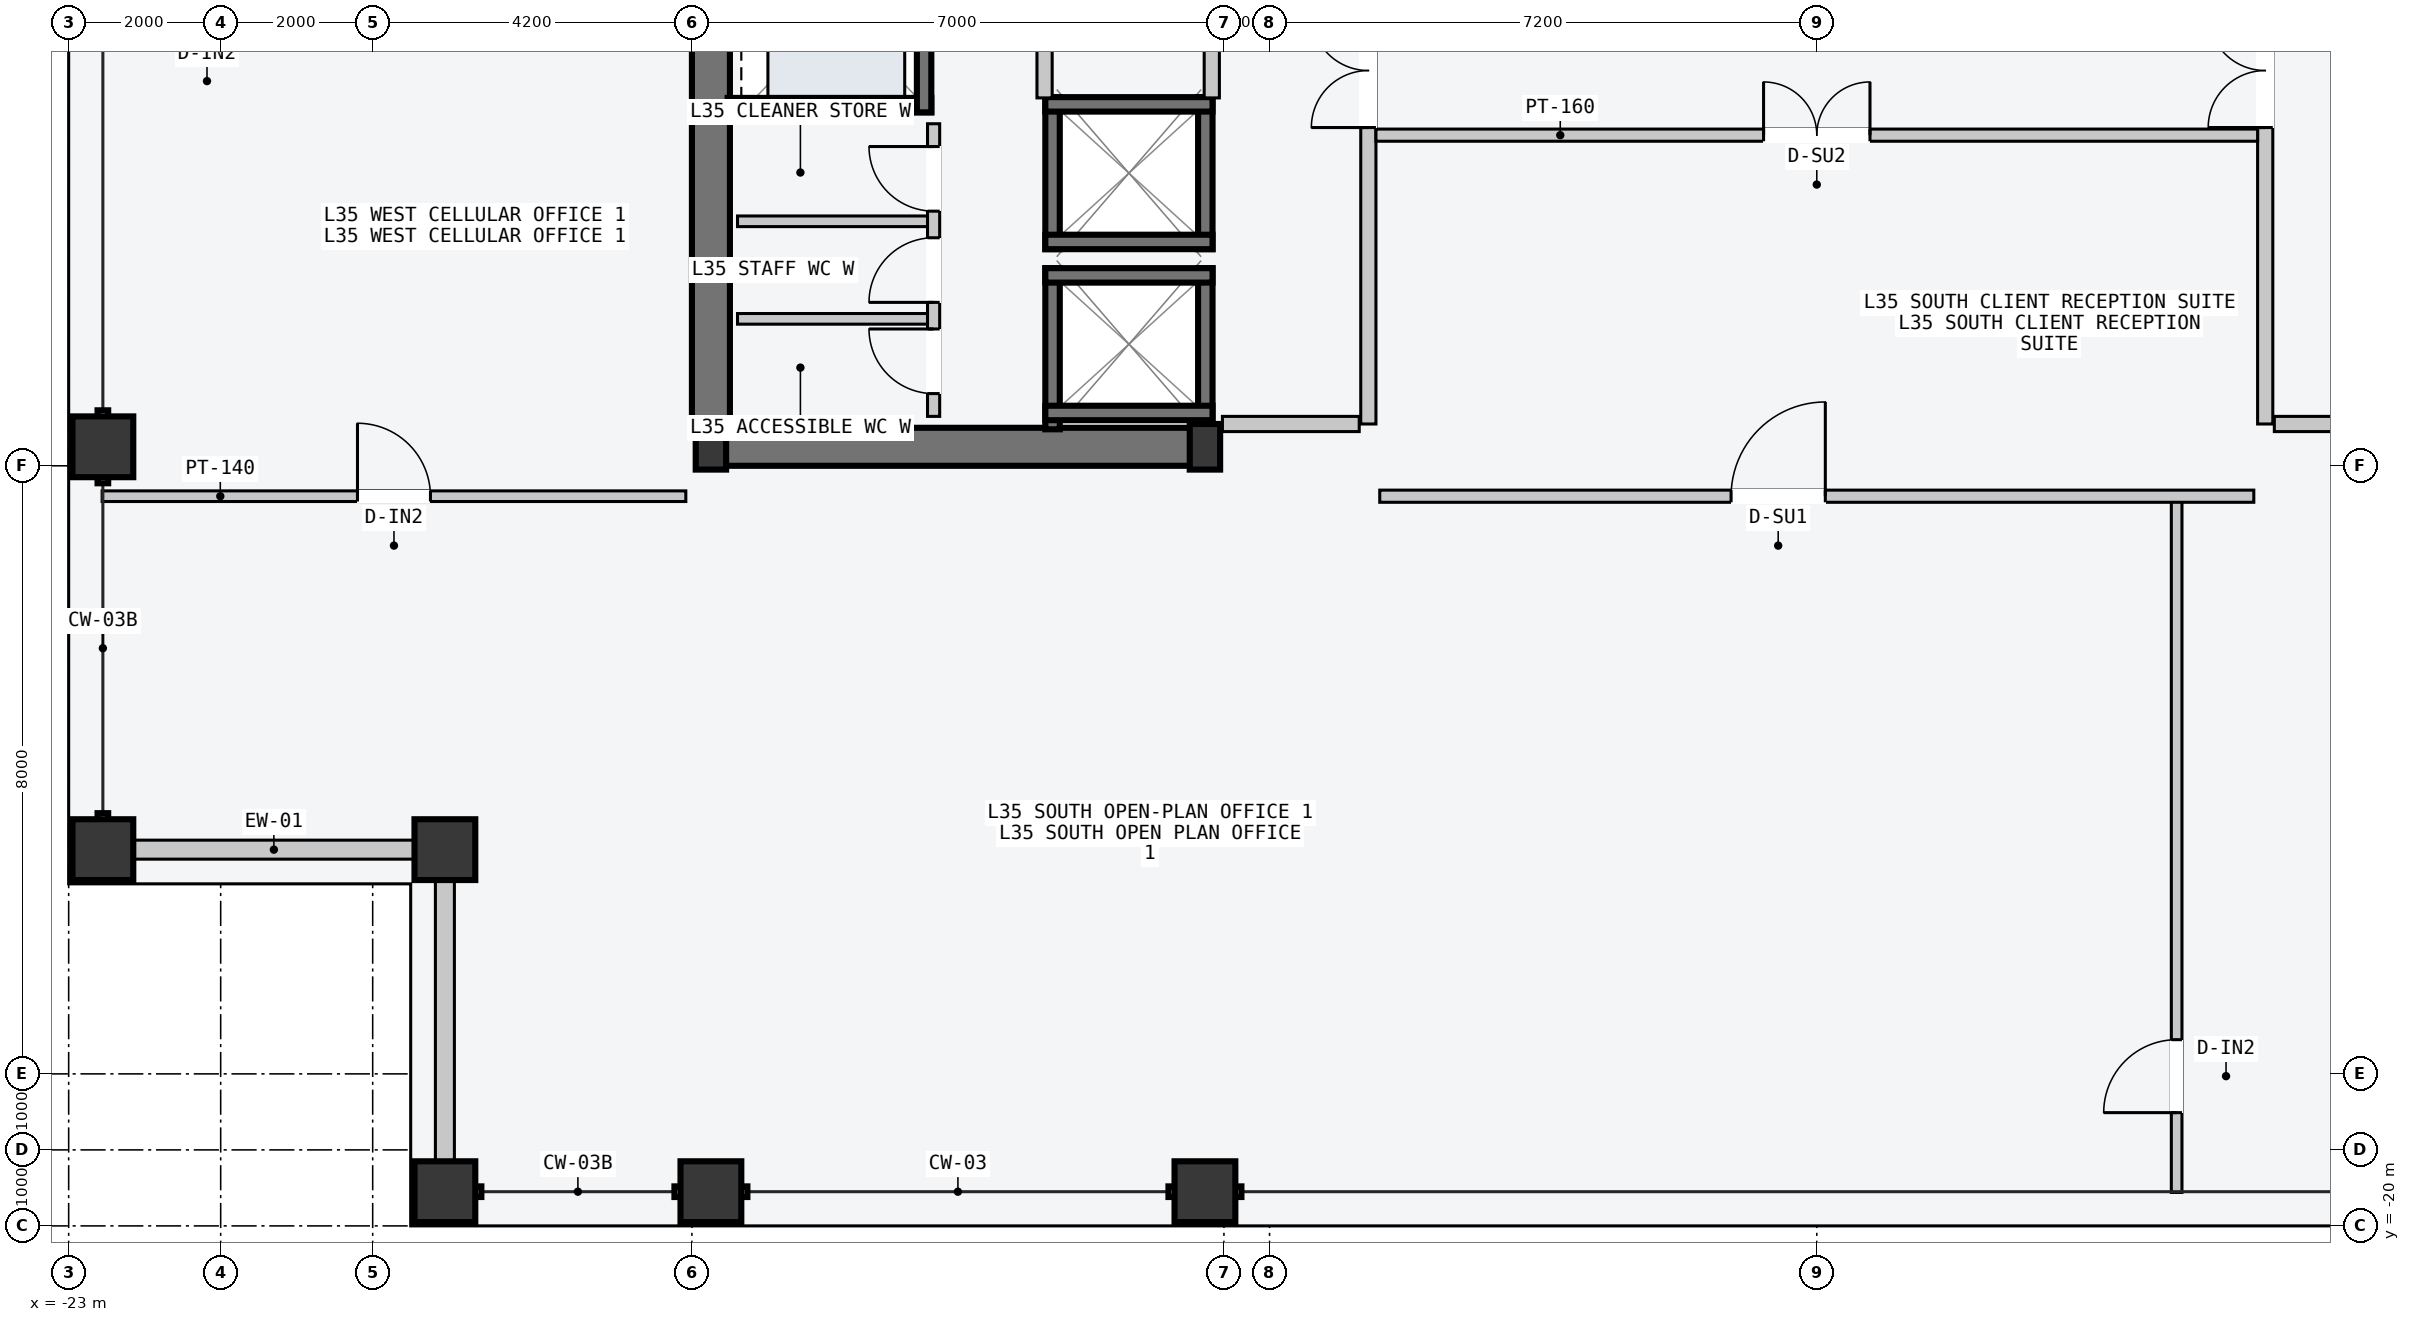
"""IFC4 building model, lengths in metres.
Left out: names, types, materials, properties, quantities, classifications, styles, units other than length and angle.
Written with IfcOpenShell. Run it as: python <this file> out.ifc"""

import sys

from ifc_helpers import new_model, si_unit, direction, frame, frame_2d, origin, origin_2d, place, context, subcontext, project, spatial, rectangle, hollow_rectangle, i_section, extrude, element, fill, save


model = new_model("IFC4")
c1 = context("Model", 3, precision=1e-05, world=origin(), true_north=direction((0.0, 1.0)))
c2 = subcontext(c1, "Body", "Model", "MODEL_VIEW")
j1 = project(units=[si_unit("LENGTHUNIT", "METRE"), si_unit("PLANEANGLEUNIT", "RADIAN")], contexts=[c1])
p1 = place(None, origin())
s1 = spatial("IfcSite", under=j1, at=p1, CompositionType="ELEMENT")
p2 = place(p1, origin())
s2 = spatial("IfcBuilding", under=s1, at=p2, CompositionType="ELEMENT")
p3 = place(p2, frame((0.0, 0.0, 135.0)))
s3 = spatial("IfcBuildingStorey", under=s2, at=p3, CompositionType="ELEMENT", Elevation=135.0)
p4 = place(p3, frame((-14.53, -9.75, -0.2), z_axis=(0.0, 0.0, 1.0), x_axis=(1.0, 0.0, 0.0)))
e1 = element("IfcWall", 1, at=p4, inside=s3, PredefinedType="SHEAR", context=c2, shape_type="SweptSolid", body=[
    extrude(rectangle(XDim=6.46, YDim=0.5, at=frame_2d((3.23, 0.0))), origin(), (0.0, 0.0, 1.0), 3.6),
])
p5 = place(p3, frame((-14.55, -9.45, -0.2), z_axis=(0.0, 0.0, 1.0), x_axis=(0.0, 1.0, 0.0)))
e2 = element("IfcWall", 2, at=p5, inside=s3, PredefinedType="SHEAR", context=c2, shape_type="SweptSolid", body=[
    extrude(rectangle(XDim=9.15, YDim=0.5, at=frame_2d((4.575, 0.0))), origin(), (0.0, 0.0, 1.0), 3.6),
])
for number, where, z_axis, x_axis in (
    (3, (-14.55, -9.75, 0.0), (0.0, 0.0, 1.0), (1.0, 0.0, 0.0)),
    (4, (-8.05, -9.75, 0.0), (0.0, 0.0, 1.0), (1.0, 0.0, 0.0)),
):
    element("IfcColumn", number, at=place(p3, frame(where, z_axis=z_axis, x_axis=x_axis)), inside=s3, PredefinedType="COLUMN", context=c2, shape_type="SweptSolid", body=[
        extrude(i_section(OverallWidth=0.4, OverallDepth=0.6, WebThickness=0.022, FlangeThickness=0.036, at=origin_2d()), origin(), (0.0, 0.0, 1.0), 3.6),
    ])
for number, where, z_axis, x_axis in (
    (5, (-18.05, -19.55, 0.0), (0.0, 0.0, 1.0), (1.0, 0.0, 0.0)),
    (6, (-14.55, -19.55, 0.0), (0.0, 0.0, 1.0), (1.0, 0.0, 0.0)),
    (7, (-8.05, -19.55, 0.0), (0.0, 0.0, 1.0), (1.0, 0.0, 0.0)),
    (8, (-22.55, -15.05, 0.0), (0.0, 0.0, 1.0), (0.0, 1.0, 0.0)),
    (9, (-22.55, -9.75, 0.0), (0.0, 0.0, 1.0), (0.0, 1.0, 0.0)),
    (10, (-18.05, -15.05, 0.0), (0.0, 0.0, 1.0), (1.0, 0.0, 0.0)),
):
    element("IfcColumn", number, at=place(p3, frame(where, z_axis=z_axis, x_axis=x_axis)), inside=s3, PredefinedType="COLUMN", context=c2, shape_type="SweptSolid", body=[
        extrude(hollow_rectangle(XDim=0.8, YDim=0.8, WallThickness=0.036, at=origin_2d()), origin(), (0.0, 0.0, 1.0), 3.6),
    ])
for number, where, z_axis, x_axis in (
    (11, (-22.14, -15.05, 0.0), (0.0, 0.0, 1.0), (1.0, 0.0, 0.0)),
    (12, (-18.05, -19.14, 0.0), (0.0, 0.0, 1.0), (0.0, 1.0, 0.0)),
):
    element("IfcWall", number, at=place(p3, frame(where, z_axis=z_axis, x_axis=x_axis)), inside=s3, PredefinedType="STANDARD", context=c2, shape_type="SweptSolid", body=[
        extrude(rectangle(XDim=3.68, YDim=0.25, at=frame_2d((1.84, 0.0))), origin(), (0.0, 0.0, 1.0), 2.75),
    ])
for number, where, z_axis, x_axis in (
    (13, (-8.045, -9.52, -0.2), (0.0, 0.0, 1.0), (0.0, 1.0, 0.0)),
    (14, (-10.055, -9.52, -0.2), (0.0, 0.0, 1.0), (0.0, 1.0, 0.0)),
):
    element("IfcWall", number, at=place(p3, frame(where, z_axis=z_axis, x_axis=x_axis)), inside=s3, PredefinedType="SOLIDWALL", context=c2, shape_type="SweptSolid", body=[
        extrude(rectangle(XDim=2.12, YDim=0.19, at=frame_2d((1.06, 0.0))), origin(), (0.0, 0.0, 1.0), 3.6),
    ])
for number, where, z_axis, x_axis in (
    (15, (-10.15, -7.495, -0.2), (0.0, 0.0, 1.0), (1.0, 0.0, 0.0)),
    (16, (-10.15, -9.305, -0.2), (0.0, 0.0, 1.0), (1.0, 0.0, 0.0)),
):
    element("IfcWall", number, at=place(p3, frame(where, z_axis=z_axis, x_axis=x_axis)), inside=s3, PredefinedType="SOLIDWALL", context=c2, shape_type="SweptSolid", body=[
        extrude(rectangle(XDim=2.2, YDim=0.19, at=frame_2d((1.1, 0.0))), origin(), (0.0, 0.0, 1.0), 3.6),
    ])
for number, where, z_axis, x_axis in (
    (17, (-8.045, -7.15, -0.2), (0.0, 0.0, 1.0), (0.0, 1.0, 0.0)),
    (18, (-10.055, -7.15, -0.2), (0.0, 0.0, 1.0), (0.0, 1.0, 0.0)),
):
    element("IfcWall", number, at=place(p3, frame(where, z_axis=z_axis, x_axis=x_axis)), inside=s3, PredefinedType="SOLIDWALL", context=c2, shape_type="SweptSolid", body=[
        extrude(rectangle(XDim=2.0, YDim=0.19, at=frame_2d((1.0, 0.0))), origin(), (0.0, 0.0, 1.0), 3.6),
    ])
for number, where, z_axis, x_axis in (
    (19, (-10.15, -5.245, -0.2), (0.0, 0.0, 1.0), (1.0, 0.0, 0.0)),
    (20, (-10.15, -7.055, -0.2), (0.0, 0.0, 1.0), (1.0, 0.0, 0.0)),
):
    element("IfcWall", number, at=place(p3, frame(where, z_axis=z_axis, x_axis=x_axis)), inside=s3, PredefinedType="SOLIDWALL", context=c2, shape_type="SweptSolid", body=[
        extrude(rectangle(XDim=2.2, YDim=0.19, at=frame_2d((1.1, 0.0))), origin(), (0.0, 0.0, 1.0), 3.6),
    ])
p6 = place(p3, frame((-14.33, -5.255, -0.2), z_axis=(0.0, 0.0, 1.0), x_axis=(1.0, 0.0, 0.0)))
e21 = element("IfcWall", 21, at=p6, inside=s3, PredefinedType="SOLIDWALL", context=c2, shape_type="SweptSolid", body=[
    extrude(rectangle(XDim=2.68, YDim=0.19, at=frame_2d((1.34, 0.0))), origin(), (0.0, 0.0, 1.0), 3.6),
])
p7 = place(p3, frame((-11.745, -5.35, -0.2), z_axis=(0.0, 0.0, 1.0), x_axis=(0.0, 1.0, 0.0)))
e22 = element("IfcWall", 22, at=p7, inside=s3, PredefinedType="SOLIDWALL", context=c2, shape_type="SweptSolid", body=[
    extrude(rectangle(XDim=2.6, YDim=0.19, at=frame_2d((1.3, 0.0))), origin(), (0.0, 0.0, 1.0), 3.6),
])
p8 = place(p3, frame((-5.9, -9.45, 0.0), z_axis=(0.0, 0.0, 1.0), x_axis=(0.0, 1.0, 0.0)))
e23 = element("IfcWall", 23, at=p8, inside=s3, PredefinedType="PARTITIONING", context=c2, shape_type="SweptSolid", body=[
    extrude(rectangle(XDim=10.5, YDim=0.2, at=frame_2d((5.25, 0.0))), origin(), (0.0, 0.0, 1.0), 3.4),
])
p9 = place(p8, frame((3.9, 0.0, 0.0)))
e24 = element("IfcOpeningElement", 24, at=p9, cuts=e23, PredefinedType="OPENING", context=c2, shape_type="SweptSolid", body=[
    extrude(rectangle(XDim=1.5, YDim=2.2, at=frame_2d((0.75, 1.1))), frame((0.0, 0.11, 0.0), z_axis=(0.0, -1.0, 0.0), x_axis=(1.0, 0.0, 0.0)), (0.0, 0.0, 1.0), 0.22),
])
p10 = place(p3, frame((-6.02, -9.45, 0.0), z_axis=(0.0, 0.0, 1.0), x_axis=(-1.0, 0.0, 0.0)))
e25 = element("IfcWall", 25, at=p10, inside=s3, PredefinedType="PARTITIONING", context=c2, shape_type="SweptSolid", body=[
    extrude(rectangle(XDim=1.8, YDim=0.2, at=frame_2d((0.9, 0.0))), origin(), (0.0, 0.0, 1.0), 3.4),
])
for number, where, z_axis, x_axis in (
    (26, (-7.96, -5.16, 0.0), (0.0, 0.0, 1.0), (0.0, 1.0, 0.0)),
    (27, (-10.16, -5.16, 0.0), (0.0, 0.0, 1.0), (0.0, 1.0, 0.0)),
):
    element("IfcWall", number, at=place(p3, frame(where, z_axis=z_axis, x_axis=x_axis)), inside=s3, PredefinedType="PARTITIONING", context=c2, shape_type="SweptSolid", body=[
        extrude(rectangle(XDim=2.44, YDim=0.2, at=frame_2d((1.22, 0.0))), origin(), (0.0, 0.0, 1.0), 3.4),
    ])
for number, where, z_axis, x_axis in (
    (28, (-11.7, -8.067, 0.0), (0.0, 0.0, 1.0), (-1.0, 0.0, 0.0)),
    (29, (-11.7, -6.783, 0.0), (0.0, 0.0, 1.0), (-1.0, 0.0, 0.0)),
):
    element("IfcWall", number, at=place(p3, frame(where, z_axis=z_axis, x_axis=x_axis)), inside=s3, PredefinedType="PARTITIONING", context=c2, shape_type="SweptSolid", body=[
        extrude(rectangle(XDim=2.5, YDim=0.14, at=frame_2d((1.25, 0.0))), origin(), (0.0, 0.0, 1.0), 3.4),
    ])
p11 = place(p3, frame((-11.62, -9.35, 0.0), z_axis=(0.0, 0.0, 1.0), x_axis=(0.0, 1.0, 0.0)))
e30 = element("IfcWall", 30, at=p11, inside=s3, PredefinedType="PARTITIONING", context=c2, shape_type="SweptSolid", body=[
    extrude(rectangle(XDim=3.85, YDim=0.16, at=frame_2d((1.925, 0.0))), origin(), (0.0, 0.0, 1.0), 3.4),
])
p12 = place(p11, frame((0.3, 0.0, 0.0)))
e31 = element("IfcOpeningElement", 31, at=p12, cuts=e30, PredefinedType="OPENING", context=c2, shape_type="SweptSolid", body=[
    extrude(rectangle(XDim=0.85, YDim=2.12, at=frame_2d((0.425, 1.06))), frame((0.0, 0.09, 0.0), z_axis=(0.0, -1.0, 0.0), x_axis=(1.0, 0.0, 0.0)), (0.0, 0.0, 1.0), 0.18),
])
p13 = place(p11, frame((1.5, 0.0, 0.0)))
e32 = element("IfcOpeningElement", 32, at=p13, cuts=e30, PredefinedType="OPENING", context=c2, shape_type="SweptSolid", body=[
    extrude(rectangle(XDim=0.85, YDim=2.12, at=frame_2d((0.425, 1.06))), frame((0.0, 0.09, 0.0), z_axis=(0.0, -1.0, 0.0), x_axis=(1.0, 0.0, 0.0)), (0.0, 0.0, 1.0), 0.18),
])
p14 = place(p11, frame((2.7, 0.0, 0.0)))
e33 = element("IfcOpeningElement", 33, at=p14, cuts=e30, PredefinedType="OPENING", context=c2, shape_type="SweptSolid", body=[
    extrude(rectangle(XDim=0.85, YDim=2.12, at=frame_2d((0.425, 1.06))), frame((0.0, 0.09, 0.0), z_axis=(0.0, -1.0, 0.0), x_axis=(1.0, 0.0, 0.0)), (0.0, 0.0, 1.0), 0.18),
])
p15 = place(p3, frame((5.9, -9.45, 0.0), z_axis=(0.0, 0.0, 1.0), x_axis=(0.0, 1.0, 0.0)))
e34 = element("IfcWall", 34, at=p15, inside=s3, PredefinedType="PARTITIONING", context=c2, shape_type="SweptSolid", body=[
    extrude(rectangle(XDim=18.9, YDim=0.2, at=frame_2d((9.45, 0.0))), origin(), (0.0, 0.0, 1.0), 3.4),
])
p16 = place(p15, frame((3.9, 0.0, 0.0)))
e35 = element("IfcOpeningElement", 35, at=p16, cuts=e34, PredefinedType="OPENING", context=c2, shape_type="SweptSolid", body=[
    extrude(rectangle(XDim=1.5, YDim=2.2, at=frame_2d((0.75, 1.1))), frame((0.0, 0.11, 0.0), z_axis=(0.0, -1.0, 0.0), x_axis=(1.0, 0.0, 0.0)), (0.0, 0.0, 1.0), 0.22),
])
p17 = place(p3, frame((6.02, -9.45, 0.0), z_axis=(0.0, 0.0, 1.0), x_axis=(1.0, 0.0, 0.0)))
e36 = element("IfcWall", 36, at=p17, inside=s3, PredefinedType="PARTITIONING", context=c2, shape_type="SweptSolid", body=[
    extrude(rectangle(XDim=1.8, YDim=0.2, at=frame_2d((0.9, 0.0))), origin(), (0.0, 0.0, 1.0), 3.4),
])
p18 = place(p3, frame((-5.8, -5.65, 0.0), z_axis=(0.0, 0.0, 1.0), x_axis=(1.0, 0.0, 0.0)))
e37 = element("IfcWall", 37, at=p18, inside=s3, PredefinedType="PARTITIONING", context=c2, shape_type="SweptSolid", body=[
    extrude(rectangle(XDim=11.6, YDim=0.16, at=frame_2d((5.8, 0.0))), origin(), (0.0, 0.0, 1.0), 3.4),
])
p19 = place(p18, frame((5.1, 0.0, 0.0)))
e38 = element("IfcOpeningElement", 38, at=p19, cuts=e37, PredefinedType="OPENING", context=c2, shape_type="SweptSolid", body=[
    extrude(rectangle(XDim=1.4, YDim=2.2, at=frame_2d((0.7, 1.1))), frame((0.0, 0.09, 0.0), z_axis=(0.0, -1.0, 0.0), x_axis=(1.0, 0.0, 0.0)), (0.0, 0.0, 1.0), 0.18),
])
p20 = place(p3, frame((4.735, -19.56, 0.0), z_axis=(0.0, 0.0, 1.0), x_axis=(0.0, 1.0, 0.0)))
e39 = element("IfcWall", 39, at=p20, inside=s3, PredefinedType="PARTITIONING", context=c2, shape_type="SweptSolid", body=[
    extrude(rectangle(XDim=9.1, YDim=0.14, at=frame_2d((4.55, 0.0))), origin(), (0.0, 0.0, 1.0), 3.4),
])
p21 = place(p20, frame((1.05, 0.0, 0.0)))
e40 = element("IfcOpeningElement", 40, at=p21, cuts=e39, PredefinedType="OPENING", context=c2, shape_type="SweptSolid", body=[
    extrude(rectangle(XDim=0.96, YDim=2.18, at=frame_2d((0.48, 1.09))), frame((0.0, 0.08, 0.0), z_axis=(0.0, -1.0, 0.0), x_axis=(1.0, 0.0, 0.0)), (0.0, 0.0, 1.0), 0.16),
])
p22 = place(p3, frame((-5.75, -10.4, 0.0), z_axis=(0.0, 0.0, 1.0), x_axis=(1.0, 0.0, 0.0)))
e41 = element("IfcWall", 41, at=p22, inside=s3, PredefinedType="PARTITIONING", context=c2, shape_type="SweptSolid", body=[
    extrude(rectangle(XDim=11.5, YDim=0.16, at=frame_2d((5.75, 0.0))), origin(), (0.0, 0.0, 1.0), 3.4),
])
p23 = place(p22, frame((4.622, 0.0, 0.0)))
e42 = element("IfcOpeningElement", 42, at=p23, cuts=e41, PredefinedType="OPENING", context=c2, shape_type="SweptSolid", body=[
    extrude(rectangle(XDim=1.24, YDim=2.24, at=frame_2d((0.62, 1.12))), frame((0.0, 0.09, 0.0), z_axis=(0.0, -1.0, 0.0), x_axis=(1.0, 0.0, 0.0)), (0.0, 0.0, 1.0), 0.18),
])
p24 = place(p3, frame((-22.56, -10.4, 0.0), z_axis=(0.0, 0.0, 1.0), x_axis=(1.0, 0.0, 0.0)))
e43 = element("IfcWall", 43, at=p24, inside=s3, PredefinedType="PARTITIONING", context=c2, shape_type="SweptSolid", body=[
    extrude(rectangle(XDim=7.68, YDim=0.14, at=frame_2d((3.84, 0.0))), origin(), (0.0, 0.0, 1.0), 3.4),
])
p25 = place(p24, frame((3.36, 0.0, 0.0)))
e44 = element("IfcOpeningElement", 44, at=p25, cuts=e43, PredefinedType="OPENING", context=c2, shape_type="SweptSolid", body=[
    extrude(rectangle(XDim=0.96, YDim=2.18, at=frame_2d((0.48, 1.09))), frame((0.0, 0.08, 0.0), z_axis=(0.0, -1.0, 0.0), x_axis=(1.0, 0.0, 0.0)), (0.0, 0.0, 1.0), 0.16),
])
p26 = place(p9, origin())
e45 = element("IfcDoor", 45, at=p26, inside=s3, OperationType="DOUBLE_DOOR_SINGLE_SWING", PredefinedType="DOOR", context=c2, shape_type="SweptSolid", body=[
    extrude(rectangle(XDim=1.5, YDim=2.2, at=frame_2d((0.75, 1.1))), frame((0.0, 0.025, 0.0), z_axis=(0.0, -1.0, 0.0), x_axis=(1.0, 0.0, 0.0)), (0.0, 0.0, 1.0), 0.05),
])
fill(e24, e45)
p27 = place(p12, origin())
e46 = element("IfcDoor", 46, at=p27, inside=s3, OperationType="SINGLE_SWING_RIGHT", PredefinedType="DOOR", context=c2, shape_type="SweptSolid", body=[
    extrude(rectangle(XDim=0.85, YDim=2.12, at=frame_2d((0.425, 1.06))), frame((0.0, 0.025, 0.0), z_axis=(0.0, -1.0, 0.0), x_axis=(1.0, 0.0, 0.0)), (0.0, 0.0, 1.0), 0.05),
])
fill(e31, e46)
p28 = place(p13, origin())
e47 = element("IfcDoor", 47, at=p28, inside=s3, OperationType="SINGLE_SWING_LEFT", PredefinedType="DOOR", context=c2, shape_type="SweptSolid", body=[
    extrude(rectangle(XDim=0.85, YDim=2.12, at=frame_2d((0.425, 1.06))), frame((0.0, 0.025, 0.0), z_axis=(0.0, -1.0, 0.0), x_axis=(1.0, 0.0, 0.0)), (0.0, 0.0, 1.0), 0.05),
])
fill(e32, e47)
p29 = place(p14, origin())
e48 = element("IfcDoor", 48, at=p29, inside=s3, OperationType="SINGLE_SWING_RIGHT", PredefinedType="DOOR", context=c2, shape_type="SweptSolid", body=[
    extrude(rectangle(XDim=0.85, YDim=2.12, at=frame_2d((0.425, 1.06))), frame((0.0, 0.025, 0.0), z_axis=(0.0, -1.0, 0.0), x_axis=(1.0, 0.0, 0.0)), (0.0, 0.0, 1.0), 0.05),
])
fill(e33, e48)
p30 = place(p16, origin())
e49 = element("IfcDoor", 49, at=p30, inside=s3, OperationType="DOUBLE_DOOR_SINGLE_SWING", PredefinedType="DOOR", context=c2, shape_type="SweptSolid", body=[
    extrude(rectangle(XDim=1.5, YDim=2.2, at=frame_2d((0.75, 1.1))), frame((0.0, 0.025, 0.0), z_axis=(0.0, -1.0, 0.0), x_axis=(1.0, 0.0, 0.0)), (0.0, 0.0, 1.0), 0.05),
])
fill(e35, e49)
p31 = place(p19, origin())
e50 = element("IfcDoor", 50, at=p31, inside=s3, OperationType="DOUBLE_DOOR_SINGLE_SWING", PredefinedType="DOOR", context=c2, shape_type="SweptSolid", body=[
    extrude(rectangle(XDim=1.4, YDim=2.2, at=frame_2d((0.7, 1.1))), frame((0.0, 0.025, 0.0), z_axis=(0.0, -1.0, 0.0), x_axis=(1.0, 0.0, 0.0)), (0.0, 0.0, 1.0), 0.05),
])
fill(e38, e50)
p32 = place(p21, origin())
e51 = element("IfcDoor", 51, at=p32, inside=s3, OperationType="SINGLE_SWING_LEFT", PredefinedType="DOOR", context=c2, shape_type="SweptSolid", body=[
    extrude(rectangle(XDim=0.96, YDim=2.18, at=frame_2d((0.48, 1.09))), frame((0.0, 0.025, 0.0), z_axis=(0.0, -1.0, 0.0), x_axis=(1.0, 0.0, 0.0)), (0.0, 0.0, 1.0), 0.05),
])
fill(e40, e51)
p33 = place(p23, origin())
e52 = element("IfcDoor", 52, at=p33, inside=s3, OperationType="SINGLE_SWING_RIGHT", PredefinedType="DOOR", context=c2, shape_type="SweptSolid", body=[
    extrude(rectangle(XDim=1.24, YDim=2.24, at=frame_2d((0.62, 1.12))), frame((0.0, 0.025, 0.0), z_axis=(0.0, -1.0, 0.0), x_axis=(1.0, 0.0, 0.0)), (0.0, 0.0, 1.0), 0.05),
])
fill(e42, e52)
p34 = place(p25, origin())
e53 = element("IfcDoor", 53, at=p34, inside=s3, OperationType="SINGLE_SWING_LEFT", PredefinedType="DOOR", context=c2, shape_type="SweptSolid", body=[
    extrude(rectangle(XDim=0.96, YDim=2.18, at=frame_2d((0.48, 1.09))), frame((0.0, 0.025, 0.0), z_axis=(0.0, -1.0, 0.0), x_axis=(1.0, 0.0, 0.0)), (0.0, 0.0, 1.0), 0.05),
])
fill(e44, e53)
save(model, sys.argv[1])
